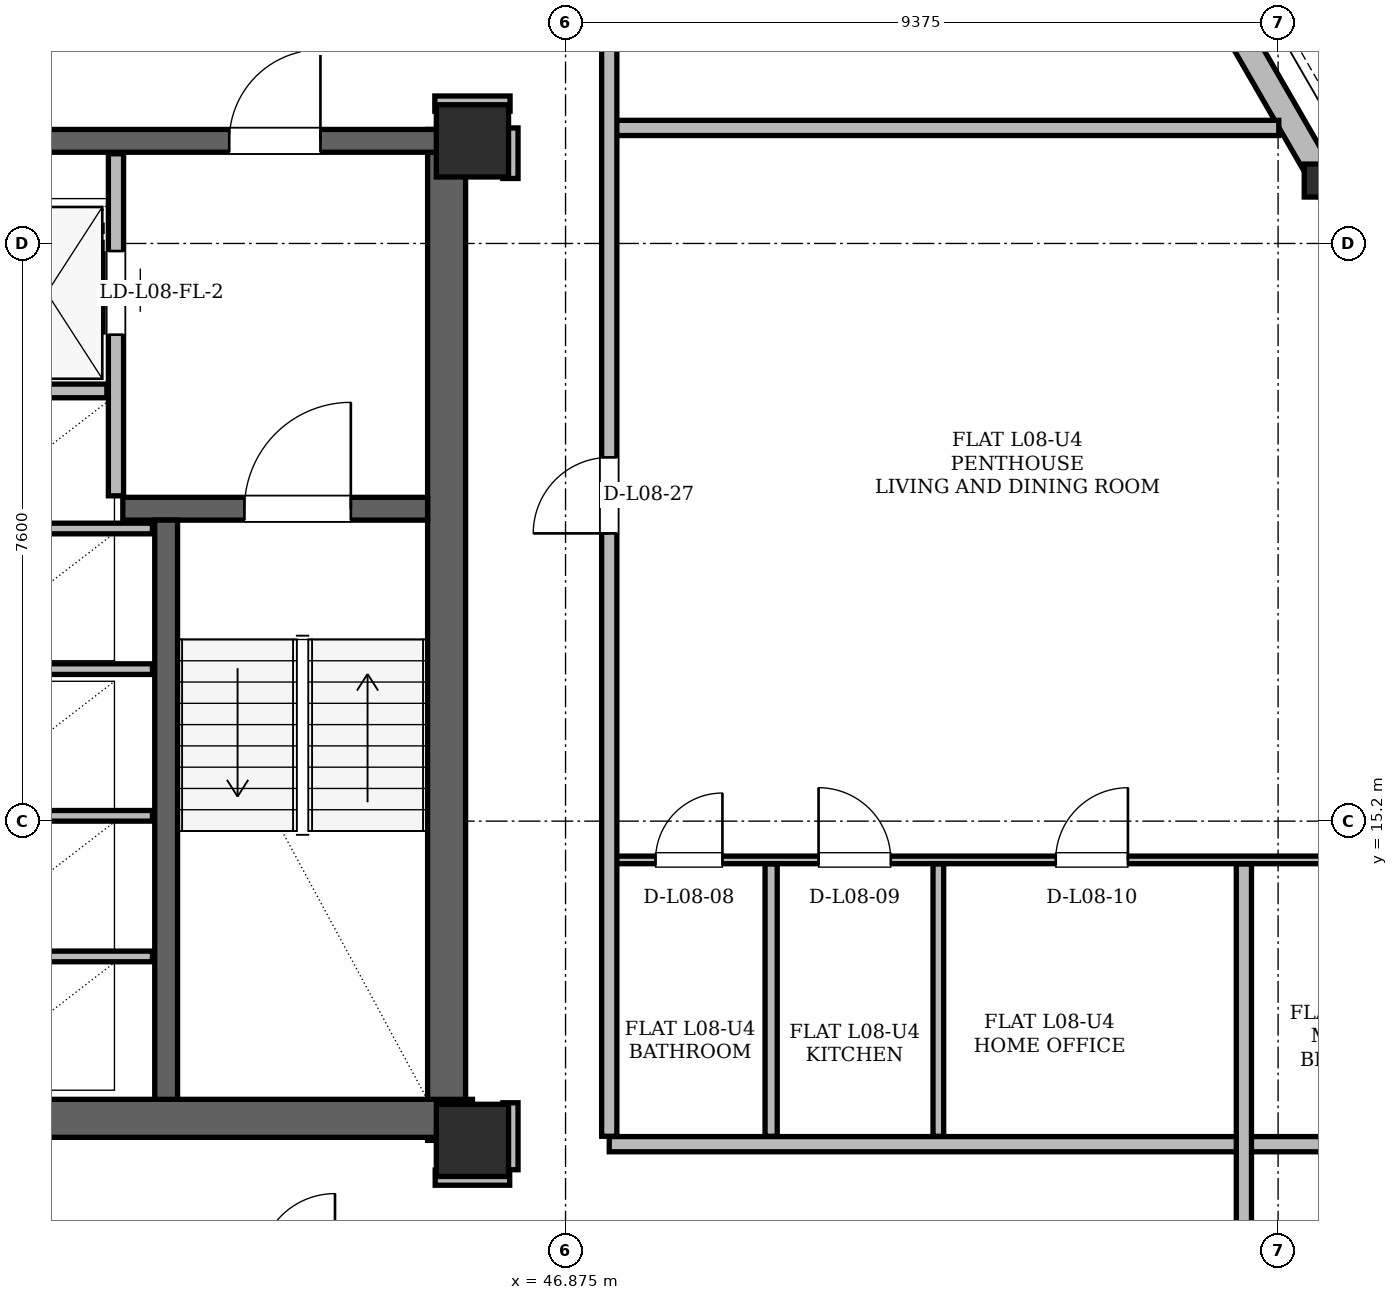
"""IFC4 building model, lengths in metres.
Left out: names, types, materials, properties, quantities, classifications, styles, units other than length and angle.
Written with IfcOpenShell. Run it as: python <this file> out.ifc"""

import sys

from ifc_helpers import new_model, si_unit, direction, frame, frame_2d, origin, origin_2d, place, context, subcontext, project, spatial, rectangle, hollow_rectangle, i_section, extrude, element, fill, save


model = new_model("IFC4")
c1 = context("Model", 3, precision=1e-05, world=origin(), true_north=direction((0.0, 1.0)))
c2 = subcontext(c1, "Body", "Model", "MODEL_VIEW")
j1 = project(units=[si_unit("LENGTHUNIT", "METRE"), si_unit("PLANEANGLEUNIT", "RADIAN")], contexts=[c1])
p1 = place(None, origin())
s1 = spatial("IfcSite", under=j1, at=p1, CompositionType="ELEMENT")
p2 = place(p1, origin())
s2 = spatial("IfcBuilding", under=s1, at=p2, CompositionType="ELEMENT")
p3 = place(p2, frame((0.0, 0.0, 34.5)))
s3 = spatial("IfcBuildingStorey", under=s2, at=p3, CompositionType="ELEMENT", Elevation=34.5)
for number, where, z_axis, x_axis in (
    (1, (45.65, 11.0, 0.0), (0.0, 0.0, 1.0), (1.0, 0.0, 0.0)),
    (2, (45.65, 24.15, 0.0), (0.0, 0.0, 1.0), (1.0, 0.0, 0.0)),
):
    element("IfcColumn", number, at=place(p3, frame(where, z_axis=z_axis, x_axis=x_axis)), inside=s3, PredefinedType="COLUMN", context=c2, shape_type="SweptSolid", body=[
        extrude(hollow_rectangle(XDim=0.95, YDim=0.95, WallThickness=0.08, at=origin_2d()), origin(), (0.0, 0.0, 1.0), 3.6),
    ])
p4 = place(p3, frame((56.84, 23.662, 0.004), z_axis=(-0.022221713768, -0.019163679763, 0.999569381692), x_axis=(0.653077047348, -0.757291469797, 0.0)))
e3 = element("IfcColumn", 3, at=p4, inside=s3, PredefinedType="COLUMN", context=c2, shape_type="SweptSolid", body=[
    extrude(i_section(OverallWidth=0.411, OverallDepth=0.434, WebThickness=0.036, FlangeThickness=0.057, at=origin_2d()), origin(), (0.0, 0.0, 1.0), 3.593),
])
p5 = place(p3, frame((45.31, 11.0, 0.0), z_axis=(0.0, 0.0, 1.0), x_axis=(0.0, 1.0, 0.0)))
e4 = element("IfcWall", 4, at=p5, inside=s3, PredefinedType="SHEAR", context=c2, shape_type="SweptSolid", body=[
    extrude(rectangle(XDim=13.3, YDim=0.5, at=frame_2d((6.65, 0.0))), origin(), (0.0, 0.0, 1.0), 3.36),
])
p6 = place(p3, frame((38.55, 11.29, 0.0), z_axis=(0.0, 0.0, 1.0), x_axis=(1.0, 0.0, 0.0)))
e5 = element("IfcWall", 5, at=p6, inside=s3, PredefinedType="SHEAR", context=c2, shape_type="SweptSolid", body=[
    extrude(rectangle(XDim=7.1, YDim=0.5, at=frame_2d((3.55, 0.0))), origin(), (0.0, 0.0, 1.0), 3.36),
])
p7 = place(p3, frame((29.65, 24.15, 0.0), z_axis=(0.0, 0.0, 1.0), x_axis=(1.0, 0.0, 0.0)))
e6 = element("IfcWall", 6, at=p7, inside=s3, PredefinedType="SHEAR", context=c2, shape_type="SweptSolid", body=[
    extrude(rectangle(XDim=15.7, YDim=0.3, at=frame_2d((7.85, 0.0))), origin(), (0.0, 0.0, 1.0), 3.36),
])
p8 = place(p7, frame((1.7, 0.0, 0.0)))
e7 = element("IfcOpeningElement", 7, at=p8, cuts=e6, PredefinedType="OPENING", context=c2, shape_type="SweptSolid", body=[
    extrude(rectangle(XDim=1.2, YDim=2.2, at=frame_2d((0.6, 1.1))), frame((0.0, 0.15, 0.0), z_axis=(0.0, -1.0, 0.0), x_axis=(1.0, 0.0, 0.0)), (0.0, 0.0, 1.0), 0.3),
])
p9 = place(p7, frame((12.8, 0.0, 0.0)))
e8 = element("IfcOpeningElement", 8, at=p9, cuts=e6, PredefinedType="OPENING", context=c2, shape_type="SweptSolid", body=[
    extrude(rectangle(XDim=1.2, YDim=2.2, at=frame_2d((0.6, 1.1))), frame((0.0, 0.15, 0.0), z_axis=(0.0, -1.0, 0.0), x_axis=(1.0, 0.0, 0.0)), (0.0, 0.0, 1.0), 0.3),
])
p10 = place(p7, frame((6.55, 0.0, 0.0)))
e9 = element("IfcOpeningElement", 9, at=p10, cuts=e6, PredefinedType="OPENING", context=c2, shape_type="SweptSolid", body=[
    extrude(rectangle(XDim=0.9, YDim=2.05, at=frame_2d((0.45, 1.025))), frame((0.0, 0.15, 0.0), z_axis=(0.0, -1.0, 0.0), x_axis=(1.0, 0.0, 0.0)), (0.0, 0.0, 1.0), 0.3),
])
p11 = place(p7, frame((8.45, 0.0, 0.0)))
e10 = element("IfcOpeningElement", 10, at=p11, cuts=e6, PredefinedType="OPENING", context=c2, shape_type="SweptSolid", body=[
    extrude(rectangle(XDim=0.9, YDim=2.05, at=frame_2d((0.45, 1.025))), frame((0.0, 0.15, 0.0), z_axis=(0.0, -1.0, 0.0), x_axis=(1.0, 0.0, 0.0)), (0.0, 0.0, 1.0), 0.3),
])
p12 = place(p3, frame((41.05, 19.31, 0.0), z_axis=(0.0, 0.0, 1.0), x_axis=(1.0, 0.0, 0.0)))
e11 = element("IfcWall", 11, at=p12, inside=s3, PredefinedType="SHEAR", context=c2, shape_type="SweptSolid", body=[
    extrude(rectangle(XDim=4.01, YDim=0.3, at=frame_2d((2.005, 0.0))), origin(), (0.0, 0.0, 1.0), 3.36),
])
p13 = place(p12, frame((1.6, 0.0, 0.0)))
e12 = element("IfcOpeningElement", 12, at=p13, cuts=e11, PredefinedType="OPENING", context=c2, shape_type="SweptSolid", body=[
    extrude(rectangle(XDim=1.4, YDim=2.2, at=frame_2d((0.7, 1.1))), frame((0.0, 0.15, 0.0), z_axis=(0.0, -1.0, 0.0), x_axis=(1.0, 0.0, 0.0)), (0.0, 0.0, 1.0), 0.3),
])
p14 = place(p3, frame((41.62, 11.54, 0.0), z_axis=(0.0, 0.0, 1.0), x_axis=(0.0, 1.0, 0.0)))
e13 = element("IfcWall", 13, at=p14, inside=s3, PredefinedType="SHEAR", context=c2, shape_type="SweptSolid", body=[
    extrude(rectangle(XDim=7.62, YDim=0.3, at=frame_2d((3.81, 0.0))), origin(), (0.0, 0.0, 1.0), 3.36),
])
p15 = place(p3, frame((53.962, 1.57, 0.0), z_axis=(0.0, 0.0, 1.0), x_axis=(0.499997339613, 0.866026939754, 0.0)))
e14 = element("IfcWall", 14, at=p15, inside=s3, PredefinedType="SOLIDWALL", context=c2, shape_type="SweptSolid", body=[
    extrude(rectangle(XDim=15.632, YDim=0.34, at=frame_2d((7.816, 0.0))), origin(), (0.0, 0.0, 1.0), 2.494),
])
p16 = place(p15, frame((13.371, 0.0, 1.28)))
e15 = element("IfcOpeningElement", 15, at=p16, cuts=e14, PredefinedType="OPENING", context=c2, shape_type="SweptSolid", body=[
    extrude(rectangle(XDim=0.85, YDim=0.92, at=frame_2d((0.425, 0.46))), frame((0.0, 0.17, 0.0), z_axis=(0.0, -1.0, 0.0), x_axis=(1.0, 0.0, 0.0)), (0.0, 0.0, 1.0), 0.34),
])
p17 = place(p3, frame((61.778, 15.108, 0.0), z_axis=(0.0, 0.0, 1.0), x_axis=(-0.499999106891, 0.866025919421, 0.0)))
e16 = element("IfcWall", 16, at=p17, inside=s3, PredefinedType="SOLIDWALL", context=c2, shape_type="SweptSolid", body=[
    extrude(rectangle(XDim=32.924, YDim=0.34, at=frame_2d((16.462, 0.0))), origin(), (0.0, 0.0, 1.0), 2.494),
])
p18 = place(p17, frame((6.159, 0.0, 0.0)))
e17 = element("IfcOpeningElement", 17, at=p18, cuts=e16, PredefinedType="OPENING", context=c2, shape_type="SweptSolid", body=[
    extrude(rectangle(XDim=1.5, YDim=2.2, at=frame_2d((0.75, 1.1))), frame((0.0, 0.17, 0.0), z_axis=(0.0, -1.0, 0.0), x_axis=(1.0, 0.0, 0.0)), (0.0, 0.0, 1.0), 0.34),
])
p19 = place(p17, frame((25.069, 0.0, 0.0)))
e18 = element("IfcOpeningElement", 18, at=p19, cuts=e16, PredefinedType="OPENING", context=c2, shape_type="SweptSolid", body=[
    extrude(rectangle(XDim=1.5, YDim=2.2, at=frame_2d((0.75, 1.1))), frame((0.0, 0.17, 0.0), z_axis=(0.0, -1.0, 0.0), x_axis=(1.0, 0.0, 0.0)), (0.0, 0.0, 1.0), 0.34),
])
p20 = place(p17, frame((2.207, 0.0, 0.85)))
e19 = element("IfcOpeningElement", 19, at=p20, cuts=e16, PredefinedType="OPENING", context=c2, shape_type="SweptSolid", body=[
    extrude(rectangle(XDim=2.2, YDim=1.534, at=frame_2d((1.1, 0.767))), frame((0.0, 0.17, 0.0), z_axis=(0.0, -1.0, 0.0), x_axis=(1.0, 0.0, 0.0)), (0.0, 0.0, 1.0), 0.34),
])
p21 = place(p17, frame((12.558, 0.0, 0.85)))
e20 = element("IfcOpeningElement", 20, at=p21, cuts=e16, PredefinedType="OPENING", context=c2, shape_type="SweptSolid", body=[
    extrude(rectangle(XDim=2.0, YDim=1.534, at=frame_2d((1.0, 0.767))), frame((0.0, 0.17, 0.0), z_axis=(0.0, -1.0, 0.0), x_axis=(1.0, 0.0, 0.0)), (0.0, 0.0, 1.0), 0.34),
])
p22 = place(p17, frame((19.845, 0.0, 0.85)))
e21 = element("IfcOpeningElement", 21, at=p22, cuts=e16, PredefinedType="OPENING", context=c2, shape_type="SweptSolid", body=[
    extrude(rectangle(XDim=1.4, YDim=1.534, at=frame_2d((0.7, 0.767))), frame((0.0, 0.17, 0.0), z_axis=(0.0, -1.0, 0.0), x_axis=(1.0, 0.0, 0.0)), (0.0, 0.0, 1.0), 0.34),
])
p23 = place(p17, frame((30.606, 0.0, 0.85)))
e22 = element("IfcOpeningElement", 22, at=p23, cuts=e16, PredefinedType="OPENING", context=c2, shape_type="SweptSolid", body=[
    extrude(rectangle(XDim=1.2, YDim=1.48, at=frame_2d((0.6, 0.74))), frame((0.0, 0.17, 0.0), z_axis=(0.0, -1.0, 0.0), x_axis=(1.0, 0.0, 0.0)), (0.0, 0.0, 1.0), 0.34),
])
p24 = place(p3, frame((40.96, 19.48, 0.0), z_axis=(0.0, 0.0, 1.0), x_axis=(0.0, 1.0, 0.0)))
e23 = element("IfcWall", 23, at=p24, inside=s3, PredefinedType="PARTITIONING", context=c2, shape_type="SweptSolid", body=[
    extrude(rectangle(XDim=4.5, YDim=0.2, at=frame_2d((2.25, 0.0))), origin(), (0.0, 0.0, 1.0), 2.4),
])
p25 = place(p24, frame((2.12, 0.0, 0.0)))
e24 = element("IfcOpeningElement", 24, at=p25, cuts=e23, PredefinedType="OPENING", context=c2, shape_type="SweptSolid", body=[
    extrude(rectangle(XDim=1.1, YDim=2.2, at=frame_2d((0.55, 1.1))), frame((0.0, 0.1, 0.0), z_axis=(0.0, -1.0, 0.0), x_axis=(1.0, 0.0, 0.0)), (0.0, 0.0, 1.0), 0.2),
])
p26 = place(p3, frame((39.26, 20.86, 0.0), z_axis=(0.0, 0.0, 1.0), x_axis=(1.0, 0.0, 0.0)))
e25 = element("IfcWall", 25, at=p26, inside=s3, PredefinedType="PARTITIONING", context=c2, shape_type="SweptSolid", body=[
    extrude(rectangle(XDim=1.58, YDim=0.18, at=frame_2d((0.79, 0.0))), origin(), (0.0, 0.0, 1.0), 3.36),
])
for number, where, z_axis, x_axis in (
    (26, (38.78, 13.42, 0.0), (0.0, 0.0, 1.0), (1.0, 0.0, 0.0)),
    (27, (38.78, 15.27, 0.0), (0.0, 0.0, 1.0), (1.0, 0.0, 0.0)),
    (28, (38.78, 17.2, 0.0), (0.0, 0.0, 1.0), (1.0, 0.0, 0.0)),
    (29, (38.78, 19.05, 0.0), (0.0, 0.0, 1.0), (1.0, 0.0, 0.0)),
):
    element("IfcWall", number, at=place(p3, frame(where, z_axis=z_axis, x_axis=x_axis)), inside=s3, PredefinedType="PARTITIONING", context=c2, shape_type="SweptSolid", body=[
        extrude(rectangle(XDim=2.66, YDim=0.14, at=frame_2d((1.33, 0.0))), origin(), (0.0, 0.0, 1.0), 3.36),
    ])
p27 = place(p3, frame((45.16, 10.51, 0.0), z_axis=(0.0, 0.0, 1.0), x_axis=(1.0, 0.0, 0.0)))
e30 = element("IfcWall", 30, at=p27, inside=s3, PredefinedType="PARTITIONING", context=c2, shape_type="SweptSolid", body=[
    extrude(rectangle(XDim=0.98, YDim=0.2, at=frame_2d((0.49, 0.0))), origin(), (0.0, 0.0, 1.0), 2.738),
])
p28 = place(p3, frame((47.45, 10.95, 0.0), z_axis=(0.0, 0.0, 1.0), x_axis=(1.0, 0.0, 0.0)))
e31 = element("IfcWall", 31, at=p28, inside=s3, PredefinedType="PARTITIONING", context=c2, shape_type="SweptSolid", body=[
    extrude(rectangle(XDim=11.726, YDim=0.2, at=frame_2d((5.863, 0.0))), origin(), (0.0, 0.0, 1.0), 3.36),
])
p29 = place(p3, frame((47.4, 14.69, 0.0), z_axis=(0.0, 0.0, 1.0), x_axis=(1.0, 0.0, 0.0)))
e32 = element("IfcWall", 32, at=p29, inside=s3, PredefinedType="PARTITIONING", context=c2, shape_type="SweptSolid", body=[
    extrude(rectangle(XDim=13.931, YDim=0.1, at=frame_2d((6.965, 0.0))), origin(), (0.0, 0.0, 1.0), 2.738),
])
p30 = place(p29, frame((0.659, 0.0, 0.0)))
e33 = element("IfcOpeningElement", 33, at=p30, cuts=e32, PredefinedType="OPENING", context=c2, shape_type="SweptSolid", body=[
    extrude(rectangle(XDim=0.88, YDim=2.08, at=frame_2d((0.44, 1.04))), frame((0.0, 0.05, 0.0), z_axis=(0.0, -1.0, 0.0), x_axis=(1.0, 0.0, 0.0)), (0.0, 0.0, 1.0), 0.1),
])
p31 = place(p29, frame((2.804, 0.0, 0.0)))
e34 = element("IfcOpeningElement", 34, at=p31, cuts=e32, PredefinedType="OPENING", context=c2, shape_type="SweptSolid", body=[
    extrude(rectangle(XDim=0.95, YDim=2.1, at=frame_2d((0.475, 1.05))), frame((0.0, 0.05, 0.0), z_axis=(0.0, -1.0, 0.0), x_axis=(1.0, 0.0, 0.0)), (0.0, 0.0, 1.0), 0.1),
])
p32 = place(p29, frame((5.924, 0.0, 0.0)))
e35 = element("IfcOpeningElement", 35, at=p32, cuts=e32, PredefinedType="OPENING", context=c2, shape_type="SweptSolid", body=[
    extrude(rectangle(XDim=0.95, YDim=2.1, at=frame_2d((0.475, 1.05))), frame((0.0, 0.05, 0.0), z_axis=(0.0, -1.0, 0.0), x_axis=(1.0, 0.0, 0.0)), (0.0, 0.0, 1.0), 0.1),
])
p33 = place(p29, frame((10.747, 0.0, 0.0)))
e36 = element("IfcOpeningElement", 36, at=p33, cuts=e32, PredefinedType="OPENING", context=c2, shape_type="SweptSolid", body=[
    extrude(rectangle(XDim=0.92, YDim=2.12, at=frame_2d((0.46, 1.06))), frame((0.0, 0.05, 0.0), z_axis=(0.0, -1.0, 0.0), x_axis=(1.0, 0.0, 0.0)), (0.0, 0.0, 1.0), 0.1),
])
p34 = place(p3, frame((47.45, 24.32, 0.0), z_axis=(0.0, 0.0, 1.0), x_axis=(1.0, 0.0, 0.0)))
e37 = element("IfcWall", 37, at=p34, inside=s3, PredefinedType="PARTITIONING", context=c2, shape_type="SweptSolid", body=[
    extrude(rectangle(XDim=8.809, YDim=0.2, at=frame_2d((4.404, 0.0))), origin(), (0.0, 0.0, 1.0), 2.494),
])
p35 = place(p3, frame((45.155, 24.64, 0.0), z_axis=(0.0, 0.0, 1.0), x_axis=(1.0, 0.0, 0.0)))
e38 = element("IfcWall", 38, at=p35, inside=s3, PredefinedType="PARTITIONING", context=c2, shape_type="SweptSolid", body=[
    extrude(rectangle(XDim=0.99, YDim=0.2, at=frame_2d((0.495, 0.0))), origin(), (0.0, 0.0, 1.0), 2.738),
])
p36 = place(p3, frame((46.15, 10.614, 0.0), z_axis=(0.0, 0.0, 1.0), x_axis=(0.0, 1.0, 0.0)))
e39 = element("IfcWall", 39, at=p36, inside=s3, PredefinedType="PARTITIONING", context=c2, shape_type="SweptSolid", body=[
    extrude(rectangle(XDim=0.881, YDim=0.2, at=frame_2d((0.44, 0.0))), origin(), (0.0, 0.0, 1.0), 2.738),
])
p37 = place(p3, frame((46.15, 23.655, 0.0), z_axis=(0.0, 0.0, 1.0), x_axis=(0.0, 1.0, 0.0)))
e40 = element("IfcWall", 40, at=p37, inside=s3, PredefinedType="PARTITIONING", context=c2, shape_type="SweptSolid", body=[
    extrude(rectangle(XDim=0.665, YDim=0.2, at=frame_2d((0.333, 0.0))), origin(), (0.0, 0.0, 1.0), 3.36),
])
p38 = place(p3, frame((47.45, 11.054, 0.0), z_axis=(0.0, 0.0, 1.0), x_axis=(0.0, 1.0, 0.0)))
e41 = element("IfcWall", 41, at=p38, inside=s3, PredefinedType="PARTITIONING", context=c2, shape_type="SweptSolid", body=[
    extrude(rectangle(XDim=14.812, YDim=0.2, at=frame_2d((7.406, 0.0))), origin(), (0.0, 0.0, 1.0), 2.738),
])
p39 = place(p38, frame((7.932, 0.0, 0.0)))
e42 = element("IfcOpeningElement", 42, at=p39, cuts=e41, PredefinedType="OPENING", context=c2, shape_type="SweptSolid", body=[
    extrude(rectangle(XDim=1.0, YDim=2.18, at=frame_2d((0.5, 1.09))), frame((0.0, 0.1, 0.0), z_axis=(0.0, -1.0, 0.0), x_axis=(1.0, 0.0, 0.0)), (0.0, 0.0, 1.0), 0.2),
])
p40 = place(p3, frame((49.58, 11.054, 0.0), z_axis=(0.0, 0.0, 1.0), x_axis=(0.0, 1.0, 0.0)))
e43 = element("IfcWall", 43, at=p40, inside=s3, PredefinedType="PARTITIONING", context=c2, shape_type="SweptSolid", body=[
    extrude(rectangle(XDim=3.582, YDim=0.16, at=frame_2d((1.791, 0.0))), origin(), (0.0, 0.0, 1.0), 2.738),
])
p41 = place(p3, frame((51.78, 11.054, 0.0), z_axis=(0.0, 0.0, 1.0), x_axis=(0.0, 1.0, 0.0)))
e44 = element("IfcWall", 44, at=p41, inside=s3, PredefinedType="PARTITIONING", context=c2, shape_type="SweptSolid", body=[
    extrude(rectangle(XDim=3.582, YDim=0.14, at=frame_2d((1.791, 0.0))), origin(), (0.0, 0.0, 1.0), 2.738),
])
p42 = place(p3, frame((55.8, 9.404, 0.0), z_axis=(0.0, 0.0, 1.0), x_axis=(0.0, 1.0, 0.0)))
e45 = element("IfcWall", 45, at=p42, inside=s3, PredefinedType="PARTITIONING", context=c2, shape_type="SweptSolid", body=[
    extrude(rectangle(XDim=5.232, YDim=0.2, at=frame_2d((2.616, 0.0))), origin(), (0.0, 0.0, 1.0), 2.738),
])
p43 = place(p25, origin())
e46 = element("IfcDoor", 46, at=p43, inside=s3, OperationType="SLIDING_TO_RIGHT", PredefinedType="DOOR", context=c2, shape_type="SweptSolid", body=[
    extrude(rectangle(XDim=1.1, YDim=2.2, at=frame_2d((0.55, 1.1))), frame((0.0, 0.025, 0.0), z_axis=(0.0, -1.0, 0.0), x_axis=(1.0, 0.0, 0.0)), (0.0, 0.0, 1.0), 0.05),
])
fill(e24, e46)
p44 = place(p13, origin())
e47 = element("IfcDoor", 47, at=p44, inside=s3, OperationType="SINGLE_SWING_RIGHT", PredefinedType="DOOR", context=c2, shape_type="SweptSolid", body=[
    extrude(rectangle(XDim=1.4, YDim=2.2, at=frame_2d((0.7, 1.1))), frame((0.0, 0.025, 0.0), z_axis=(0.0, -1.0, 0.0), x_axis=(1.0, 0.0, 0.0)), (0.0, 0.0, 1.0), 0.05),
])
fill(e12, e47)
p45 = place(p9, origin())
e48 = element("IfcDoor", 48, at=p45, inside=s3, OperationType="SINGLE_SWING_RIGHT", PredefinedType="DOOR", context=c2, shape_type="SweptSolid", body=[
    extrude(rectangle(XDim=1.2, YDim=2.2, at=frame_2d((0.6, 1.1))), frame((0.0, 0.025, 0.0), z_axis=(0.0, -1.0, 0.0), x_axis=(1.0, 0.0, 0.0)), (0.0, 0.0, 1.0), 0.05),
])
fill(e8, e48)
p46 = place(p30, origin())
e49 = element("IfcDoor", 49, at=p46, inside=s3, OperationType="SINGLE_SWING_RIGHT", PredefinedType="DOOR", context=c2, shape_type="SweptSolid", body=[
    extrude(rectangle(XDim=0.88, YDim=2.08, at=frame_2d((0.44, 1.04))), frame((0.0, 0.025, 0.0), z_axis=(0.0, -1.0, 0.0), x_axis=(1.0, 0.0, 0.0)), (0.0, 0.0, 1.0), 0.05),
])
fill(e33, e49)
p47 = place(p31, origin())
e50 = element("IfcDoor", 50, at=p47, inside=s3, OperationType="SINGLE_SWING_LEFT", PredefinedType="DOOR", context=c2, shape_type="SweptSolid", body=[
    extrude(rectangle(XDim=0.95, YDim=2.1, at=frame_2d((0.475, 1.05))), frame((0.0, 0.025, 0.0), z_axis=(0.0, -1.0, 0.0), x_axis=(1.0, 0.0, 0.0)), (0.0, 0.0, 1.0), 0.05),
])
fill(e34, e50)
p48 = place(p32, origin())
e51 = element("IfcDoor", 51, at=p48, inside=s3, OperationType="SINGLE_SWING_RIGHT", PredefinedType="DOOR", context=c2, shape_type="SweptSolid", body=[
    extrude(rectangle(XDim=0.95, YDim=2.1, at=frame_2d((0.475, 1.05))), frame((0.0, 0.025, 0.0), z_axis=(0.0, -1.0, 0.0), x_axis=(1.0, 0.0, 0.0)), (0.0, 0.0, 1.0), 0.05),
])
fill(e35, e51)
p49 = place(p39, origin())
e52 = element("IfcDoor", 52, at=p49, inside=s3, OperationType="SINGLE_SWING_LEFT", PredefinedType="DOOR", context=c2, shape_type="SweptSolid", body=[
    extrude(rectangle(XDim=1.0, YDim=2.18, at=frame_2d((0.5, 1.09))), frame((0.0, 0.025, 0.0), z_axis=(0.0, -1.0, 0.0), x_axis=(1.0, 0.0, 0.0)), (0.0, 0.0, 1.0), 0.05),
])
fill(e42, e52)
save(model, sys.argv[1])
